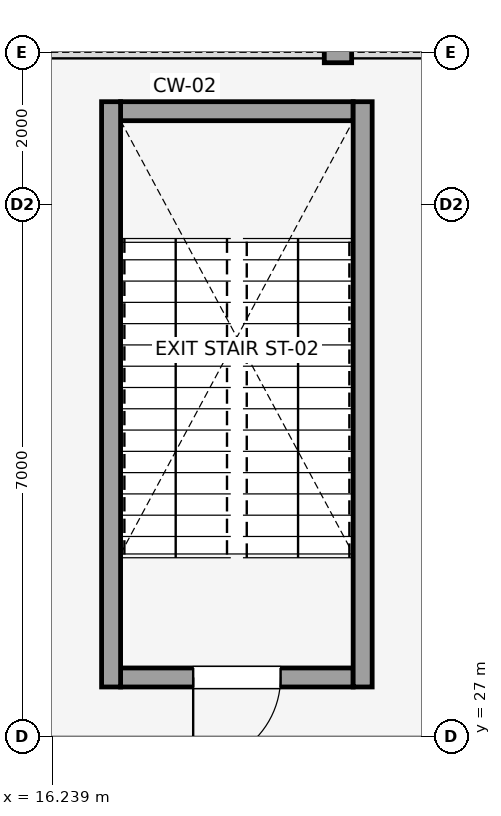
"""IFC4 building model, lengths in metres.
Left out: names, types, materials, properties, quantities, classifications, styles, units other than length and angle.
Written with IfcOpenShell. Run it as: python <this file> out.ifc"""

import sys

from ifc_helpers import new_model, si_unit, direction, frame, frame_2d, origin, place, context, subcontext, project, spatial, rectangle, extrude, element, fill, save


model = new_model("IFC4")
c1 = context("Model", 3, precision=1e-05, world=origin(), true_north=direction((0.0, 1.0)))
c2 = subcontext(c1, "Body", "Model", "MODEL_VIEW")
j1 = project(units=[si_unit("LENGTHUNIT", "METRE"), si_unit("PLANEANGLEUNIT", "RADIAN")], contexts=[c1])
p1 = place(None, origin())
s1 = spatial("IfcSite", under=j1, at=p1, CompositionType="ELEMENT")
p2 = place(p1, origin())
s2 = spatial("IfcBuilding", under=s1, at=p2, CompositionType="ELEMENT")
p3 = place(p2, frame((0.0, 0.0, 9.0)))
s3 = spatial("IfcBuildingStorey", under=s2, at=p3, CompositionType="ELEMENT", Elevation=9.0)
p4 = place(p3, frame((20.18, 36.0, 0.0), z_axis=(0.0, 0.0, 1.0), x_axis=(-1.0, 0.0, 0.0)))
e1 = element("IfcWall", 1, at=p4, inside=s3, PredefinedType="SOLIDWALL", context=c2, shape_type="SweptSolid", body=[
    extrude(rectangle(XDim=0.36, YDim=0.275, at=frame_2d((0.18, 0.0))), origin(), (0.0, 0.0, 1.0), 3.42),
])
p5 = place(p3, frame((20.2, 27.775, 0.0), z_axis=(0.0, 0.0, 1.0), x_axis=(-1.0, 0.0, 0.0)))
e2 = element("IfcWall", 2, at=p5, inside=s3, PredefinedType="SHEAR", context=c2, shape_type="SweptSolid", body=[
    extrude(rectangle(XDim=3.06, YDim=0.25, at=frame_2d((1.53, 0.0))), origin(), (0.0, 0.0, 1.0), 4.8),
])
p6 = place(p5, frame((0.955, 0.0, 0.0)))
e3 = element("IfcOpeningElement", 3, at=p6, cuts=e2, PredefinedType="OPENING", context=c2, shape_type="SweptSolid", body=[
    extrude(rectangle(XDim=1.15, YDim=2.15, at=frame_2d((0.575, 1.075))), frame((0.0, 0.135, 0.0), z_axis=(0.0, -1.0, 0.0), x_axis=(1.0, 0.0, 0.0)), (0.0, 0.0, 1.0), 0.27),
])
p7 = place(p3, frame((20.2, 35.225, 0.0), z_axis=(0.0, 0.0, 1.0), x_axis=(-1.0, 0.0, 0.0)))
e4 = element("IfcWall", 4, at=p7, inside=s3, PredefinedType="SHEAR", context=c2, shape_type="SweptSolid", body=[
    extrude(rectangle(XDim=3.06, YDim=0.25, at=frame_2d((1.53, 0.0))), origin(), (0.0, 0.0, 1.0), 4.8),
])
for number, where, z_axis, x_axis in (
    (5, (20.325, 27.65, 0.0), (0.0, 0.0, 1.0), (0.0, 1.0, 0.0)),
    (6, (17.015, 27.65, 0.0), (0.0, 0.0, 1.0), (0.0, 1.0, 0.0)),
):
    element("IfcWall", number, at=place(p3, frame(where, z_axis=z_axis, x_axis=x_axis)), inside=s3, PredefinedType="SHEAR", context=c2, shape_type="SweptSolid", body=[
        extrude(rectangle(XDim=7.7, YDim=0.25, at=frame_2d((3.85, 0.0))), origin(), (0.0, 0.0, 1.0), 4.8),
    ])
p8 = place(p6, origin())
e7 = element("IfcDoor", 7, at=p8, inside=s3, OperationType="SINGLE_SWING_RIGHT", PredefinedType="DOOR", context=c2, shape_type="SweptSolid", body=[
    extrude(rectangle(XDim=1.15, YDim=2.15, at=frame_2d((0.575, 1.075))), frame((0.0, 0.025, 0.0), z_axis=(0.0, -1.0, 0.0), x_axis=(1.0, 0.0, 0.0)), (0.0, 0.0, 1.0), 0.05),
])
fill(e3, e7)
save(model, sys.argv[1])
